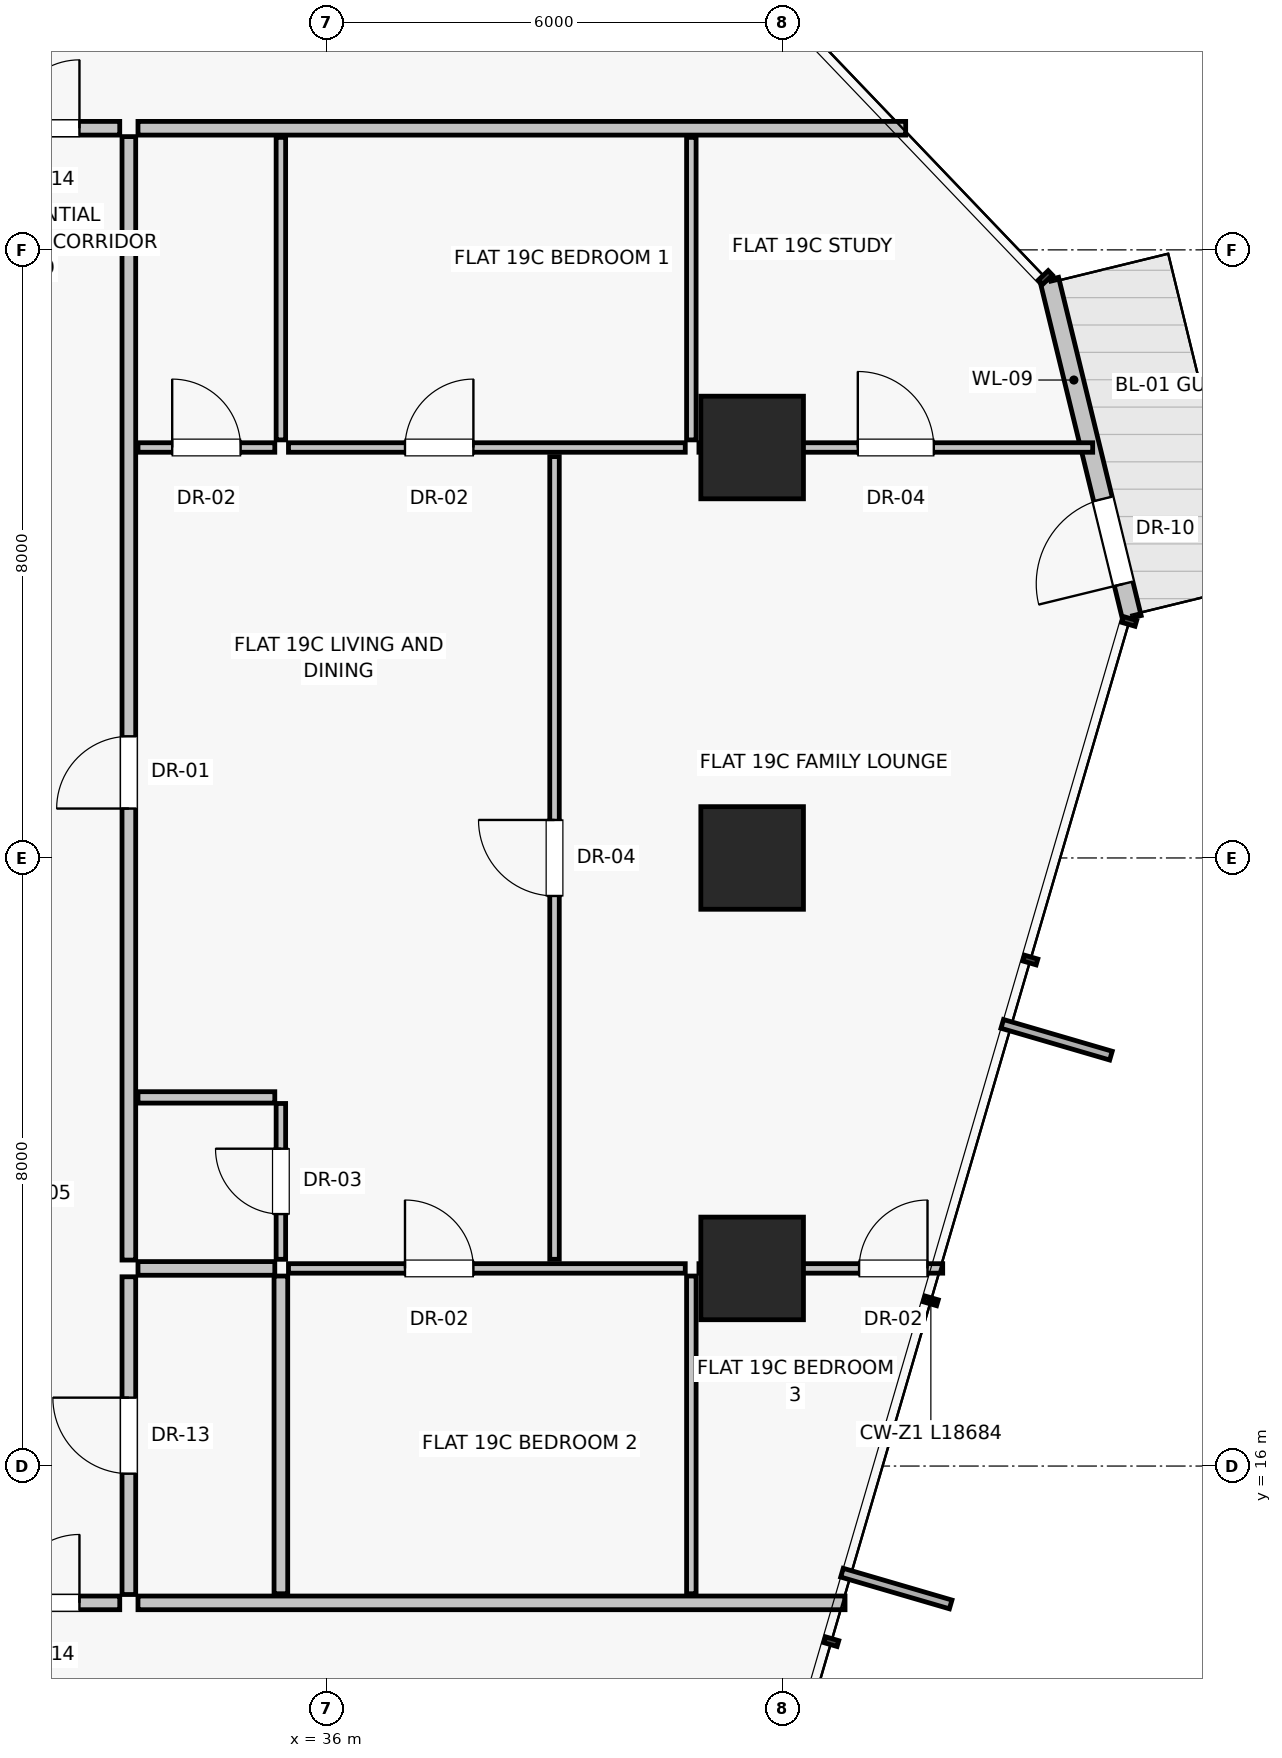
"""IFC4 building model, lengths in metres.
Left out: names, types, materials, properties, quantities, classifications, styles, units other than length and angle.
Written with IfcOpenShell. Run it as: python <this file> out.ifc"""

import sys

from ifc_helpers import new_model, si_unit, direction, frame, frame_2d, origin, origin_2d, place, context, subcontext, project, spatial, rectangle, extrude, source, transform, mapped, element, fill, save


model = new_model("IFC4")
c1 = context("Model", 3, precision=1e-05, world=origin(), true_north=direction((0.0, 1.0)))
c2 = subcontext(c1, "Body", "Model", "MODEL_VIEW")
j1 = project(units=[si_unit("LENGTHUNIT", "METRE"), si_unit("PLANEANGLEUNIT", "RADIAN")], contexts=[c1])
p1 = place(None, origin())
s1 = spatial("IfcSite", under=j1, at=p1, CompositionType="ELEMENT")
p2 = place(p1, origin())
s2 = spatial("IfcBuilding", under=s1, at=p2, CompositionType="ELEMENT")
p3 = place(p2, frame((0.0, 0.0, 70.6)))
s3 = spatial("IfcBuildingStorey", under=s2, at=p3, CompositionType="ELEMENT", Elevation=70.6)
for number, where, z_axis, x_axis in (
    (1, (41.6, 18.6, 0.0), (0.0, 0.0, 1.0), (1.0, 0.0, 0.0)),
    (2, (41.6, 24.0, 0.0), (0.0, 0.0, 1.0), (1.0, 0.0, 0.0)),
    (3, (41.6, 29.4, 0.0), (0.0, 0.0, 1.0), (1.0, 0.0, 0.0)),
):
    element("IfcColumn", number, at=place(p3, frame(where, z_axis=z_axis, x_axis=x_axis)), inside=s3, PredefinedType="COLUMN", context=c2, shape_type="SweptSolid", body=[
        extrude(rectangle(XDim=1.35, YDim=1.35, at=origin_2d()), origin(), (0.0, 0.0, 1.0), 3.25),
    ])
p4 = place(p3, frame((46.596, 27.159, 0.0), z_axis=(0.0, 0.0, 1.0), x_axis=(-0.237201591256, 0.971460449584, 0.0)))
e4 = element("IfcWall", 4, at=p4, inside=s3, PredefinedType="SOLIDWALL", context=c2, shape_type="SweptSolid", body=[
    extrude(rectangle(XDim=4.58, YDim=0.25, at=frame_2d((2.29, 0.0))), origin(), (0.0, 0.0, 1.0), 3.0),
])
p5 = place(p4, frame((0.46, 0.0, 0.0)))
e5 = element("IfcOpeningElement", 5, at=p5, cuts=e4, PredefinedType="OPENING", context=c2, shape_type="SweptSolid", body=[
    extrude(rectangle(XDim=1.15, YDim=2.25, at=frame_2d((0.575, 1.125))), frame((0.0, 0.135, 0.0), z_axis=(0.0, -1.0, 0.0), x_axis=(1.0, 0.0, 0.0)), (0.0, 0.0, 1.0), 0.27),
])
p6 = place(p3, frame((33.52, 14.2, 0.0), z_axis=(0.0, 0.0, 1.0), x_axis=(1.0, 0.0, 0.0)))
e6 = element("IfcWall", 6, at=p6, inside=s3, PredefinedType="PARTITIONING", context=c2, shape_type="SweptSolid", body=[
    extrude(rectangle(XDim=9.302, YDim=0.18, at=frame_2d((4.651, 0.0))), origin(), (0.0, 0.0, 1.0), 3.0),
])
p7 = place(p3, frame((33.52, 33.6, 0.0), z_axis=(0.0, 0.0, 1.0), x_axis=(1.0, 0.0, 0.0)))
e7 = element("IfcWall", 7, at=p7, inside=s3, PredefinedType="PARTITIONING", context=c2, shape_type="SweptSolid", body=[
    extrude(rectangle(XDim=10.1, YDim=0.18, at=frame_2d((5.05, 0.0))), origin(), (0.0, 0.0, 1.0), 3.0),
])
p8 = place(p3, frame((33.4, 14.31, 0.0), z_axis=(0.0, 0.0, 1.0), x_axis=(0.0, 1.0, 0.0)))
e8 = element("IfcWall", 8, at=p8, inside=s3, PredefinedType="PARTITIONING", context=c2, shape_type="SweptSolid", body=[
    extrude(rectangle(XDim=4.18, YDim=0.18, at=frame_2d((2.09, 0.0))), origin(), (0.0, 0.0, 1.0), 3.0),
])
p9 = place(p8, frame((1.59, 0.0, 0.0)))
e9 = element("IfcOpeningElement", 9, at=p9, cuts=e8, PredefinedType="OPENING", context=c2, shape_type="SweptSolid", body=[
    extrude(rectangle(XDim=1.0, YDim=2.01, at=frame_2d((0.5, 1.005))), frame((0.0, 0.1, 0.0), z_axis=(0.0, -1.0, 0.0), x_axis=(1.0, 0.0, 0.0)), (0.0, 0.0, 1.0), 0.2),
])
p10 = place(p3, frame((33.4, 18.71, 0.0), z_axis=(0.0, 0.0, 1.0), x_axis=(0.0, 1.0, 0.0)))
e10 = element("IfcWall", 10, at=p10, inside=s3, PredefinedType="PARTITIONING", context=c2, shape_type="SweptSolid", body=[
    extrude(rectangle(XDim=14.78, YDim=0.18, at=frame_2d((7.39, 0.0))), origin(), (0.0, 0.0, 1.0), 3.0),
])
p11 = place(p10, frame((5.94, 0.0, 0.0)))
e11 = element("IfcOpeningElement", 11, at=p11, cuts=e10, PredefinedType="OPENING", context=c2, shape_type="SweptSolid", body=[
    extrude(rectangle(XDim=0.95, YDim=2.02, at=frame_2d((0.475, 1.01))), frame((0.0, 0.1, 0.0), z_axis=(0.0, -1.0, 0.0), x_axis=(1.0, 0.0, 0.0)), (0.0, 0.0, 1.0), 0.2),
])
p12 = place(p3, frame((40.8, 14.32, 0.0), z_axis=(0.0, 0.0, 1.0), x_axis=(0.0, 1.0, 0.0)))
e12 = element("IfcWall", 12, at=p12, inside=s3, PredefinedType="PARTITIONING", context=c2, shape_type="SweptSolid", body=[
    extrude(rectangle(XDim=4.18, YDim=0.125, at=frame_2d((2.09, 0.0))), origin(), (0.0, 0.0, 1.0), 3.0),
])
p13 = place(p3, frame((40.9, 18.6, 0.0), z_axis=(0.0, 0.0, 1.0), x_axis=(1.0, 0.0, 0.0)))
e13 = element("IfcWall", 13, at=p13, inside=s3, PredefinedType="PARTITIONING", context=c2, shape_type="SweptSolid", body=[
    extrude(rectangle(XDim=3.207, YDim=0.125, at=frame_2d((1.604, 0.0))), origin(), (0.0, 0.0, 1.0), 2.299),
])
p14 = place(p13, frame((2.107, 0.0, 0.0)))
e14 = element("IfcOpeningElement", 14, at=p14, cuts=e13, PredefinedType="OPENING", context=c2, shape_type="SweptSolid", body=[
    extrude(rectangle(XDim=0.9, YDim=2.01, at=frame_2d((0.45, 1.005))), frame((0.0, 0.073, 0.0), z_axis=(0.0, -1.0, 0.0), x_axis=(1.0, 0.0, 0.0)), (0.0, 0.0, 1.0), 0.145),
])
p15 = place(p3, frame((40.8, 29.5, 0.0), z_axis=(0.0, 0.0, 1.0), x_axis=(0.0, 1.0, 0.0)))
e15 = element("IfcWall", 15, at=p15, inside=s3, PredefinedType="PARTITIONING", context=c2, shape_type="SweptSolid", body=[
    extrude(rectangle(XDim=3.98, YDim=0.125, at=frame_2d((1.99, 0.0))), origin(), (0.0, 0.0, 1.0), 3.0),
])
p16 = place(p3, frame((40.9, 29.4, 0.0), z_axis=(0.0, 0.0, 1.0), x_axis=(1.0, 0.0, 0.0)))
e16 = element("IfcWall", 16, at=p16, inside=s3, PredefinedType="PARTITIONING", context=c2, shape_type="SweptSolid", body=[
    extrude(rectangle(XDim=5.18, YDim=0.125, at=frame_2d((2.59, 0.0))), origin(), (0.0, 0.0, 1.0), 2.299),
])
p17 = place(p16, frame((2.09, 0.0, 0.0)))
e17 = element("IfcOpeningElement", 17, at=p17, cuts=e16, PredefinedType="OPENING", context=c2, shape_type="SweptSolid", body=[
    extrude(rectangle(XDim=1.0, YDim=2.01, at=frame_2d((0.5, 1.005))), frame((0.0, 0.073, 0.0), z_axis=(0.0, -1.0, 0.0), x_axis=(1.0, 0.0, 0.0)), (0.0, 0.0, 1.0), 0.145),
])
p18 = place(p3, frame((39.0, 18.72, 0.0), z_axis=(0.0, 0.0, 1.0), x_axis=(0.0, 1.0, 0.0)))
e18 = element("IfcWall", 18, at=p18, inside=s3, PredefinedType="PARTITIONING", context=c2, shape_type="SweptSolid", body=[
    extrude(rectangle(XDim=10.56, YDim=0.125, at=frame_2d((5.28, 0.0))), origin(), (0.0, 0.0, 1.0), 3.0),
])
p19 = place(p18, frame((4.78, 0.0, 0.0)))
e19 = element("IfcOpeningElement", 19, at=p19, cuts=e18, PredefinedType="OPENING", context=c2, shape_type="SweptSolid", body=[
    extrude(rectangle(XDim=1.0, YDim=2.01, at=frame_2d((0.5, 1.005))), frame((0.0, 0.073, 0.0), z_axis=(0.0, -1.0, 0.0), x_axis=(1.0, 0.0, 0.0)), (0.0, 0.0, 1.0), 0.145),
])
p20 = place(p3, frame((35.4, 14.32, 0.0), z_axis=(0.0, 0.0, 1.0), x_axis=(0.0, 1.0, 0.0)))
e20 = element("IfcWall", 20, at=p20, inside=s3, PredefinedType="PARTITIONING", context=c2, shape_type="SweptSolid", body=[
    extrude(rectangle(XDim=4.18, YDim=0.18, at=frame_2d((2.09, 0.0))), origin(), (0.0, 0.0, 1.0), 3.0),
])
p21 = place(p3, frame((33.52, 18.6, 0.0), z_axis=(0.0, 0.0, 1.0), x_axis=(1.0, 0.0, 0.0)))
e21 = element("IfcWall", 21, at=p21, inside=s3, PredefinedType="PARTITIONING", context=c2, shape_type="SweptSolid", body=[
    extrude(rectangle(XDim=1.8, YDim=0.18, at=frame_2d((0.9, 0.0))), origin(), (0.0, 0.0, 1.0), 3.0),
])
p22 = place(p3, frame((35.5, 18.6, 0.0), z_axis=(0.0, 0.0, 1.0), x_axis=(1.0, 0.0, 0.0)))
e22 = element("IfcWall", 22, at=p22, inside=s3, PredefinedType="PARTITIONING", context=c2, shape_type="SweptSolid", body=[
    extrude(rectangle(XDim=5.22, YDim=0.125, at=frame_2d((2.61, 0.0))), origin(), (0.0, 0.0, 1.0), 2.299),
])
p23 = place(p22, frame((1.533, 0.0, 0.0)))
e23 = element("IfcOpeningElement", 23, at=p23, cuts=e22, PredefinedType="OPENING", context=c2, shape_type="SweptSolid", body=[
    extrude(rectangle(XDim=0.9, YDim=2.01, at=frame_2d((0.45, 1.005))), frame((0.0, 0.073, 0.0), z_axis=(0.0, -1.0, 0.0), x_axis=(1.0, 0.0, 0.0)), (0.0, 0.0, 1.0), 0.145),
])
p24 = place(p3, frame((33.52, 20.85, 0.0), z_axis=(0.0, 0.0, 1.0), x_axis=(1.0, 0.0, 0.0)))
e24 = element("IfcWall", 24, at=p24, inside=s3, PredefinedType="PARTITIONING", context=c2, shape_type="SweptSolid", body=[
    extrude(rectangle(XDim=1.8, YDim=0.15, at=frame_2d((0.9, 0.0))), origin(), (0.0, 0.0, 1.0), 3.0),
])
p25 = place(p3, frame((35.4, 18.72, 0.0), z_axis=(0.0, 0.0, 1.0), x_axis=(0.0, 1.0, 0.0)))
e25 = element("IfcWall", 25, at=p25, inside=s3, PredefinedType="PARTITIONING", context=c2, shape_type="SweptSolid", body=[
    extrude(rectangle(XDim=2.05, YDim=0.125, at=frame_2d((1.025, 0.0))), origin(), (0.0, 0.0, 1.0), 3.0),
])
p26 = place(p25, frame((0.595, 0.0, 0.0)))
e26 = element("IfcOpeningElement", 26, at=p26, cuts=e25, PredefinedType="OPENING", context=c2, shape_type="SweptSolid", body=[
    extrude(rectangle(XDim=0.86, YDim=2.01, at=frame_2d((0.43, 1.005))), frame((0.0, 0.073, 0.0), z_axis=(0.0, -1.0, 0.0), x_axis=(1.0, 0.0, 0.0)), (0.0, 0.0, 1.0), 0.145),
])
p27 = place(p3, frame((33.52, 29.4, 0.0), z_axis=(0.0, 0.0, 1.0), x_axis=(1.0, 0.0, 0.0)))
e27 = element("IfcWall", 27, at=p27, inside=s3, PredefinedType="PARTITIONING", context=c2, shape_type="SweptSolid", body=[
    extrude(rectangle(XDim=1.8, YDim=0.125, at=frame_2d((0.9, 0.0))), origin(), (0.0, 0.0, 1.0), 3.0),
])
p28 = place(p27, frame((0.45, 0.0, 0.0)))
e28 = element("IfcOpeningElement", 28, at=p28, cuts=e27, PredefinedType="OPENING", context=c2, shape_type="SweptSolid", body=[
    extrude(rectangle(XDim=0.9, YDim=2.01, at=frame_2d((0.45, 1.005))), frame((0.0, 0.073, 0.0), z_axis=(0.0, -1.0, 0.0), x_axis=(1.0, 0.0, 0.0)), (0.0, 0.0, 1.0), 0.145),
])
p29 = place(p3, frame((35.4, 29.5, 0.0), z_axis=(0.0, 0.0, 1.0), x_axis=(0.0, 1.0, 0.0)))
e29 = element("IfcWall", 29, at=p29, inside=s3, PredefinedType="PARTITIONING", context=c2, shape_type="SweptSolid", body=[
    extrude(rectangle(XDim=3.98, YDim=0.125, at=frame_2d((1.99, 0.0))), origin(), (0.0, 0.0, 1.0), 3.0),
])
p30 = place(p3, frame((35.5, 29.4, 0.0), z_axis=(0.0, 0.0, 1.0), x_axis=(1.0, 0.0, 0.0)))
e30 = element("IfcWall", 30, at=p30, inside=s3, PredefinedType="PARTITIONING", context=c2, shape_type="SweptSolid", body=[
    extrude(rectangle(XDim=5.22, YDim=0.125, at=frame_2d((2.61, 0.0))), origin(), (0.0, 0.0, 1.0), 2.299),
])
p31 = place(p30, frame((1.533, 0.0, 0.0)))
e31 = element("IfcOpeningElement", 31, at=p31, cuts=e30, PredefinedType="OPENING", context=c2, shape_type="SweptSolid", body=[
    extrude(rectangle(XDim=0.9, YDim=2.01, at=frame_2d((0.45, 1.005))), frame((0.0, 0.073, 0.0), z_axis=(0.0, -1.0, 0.0), x_axis=(1.0, 0.0, 0.0)), (0.0, 0.0, 1.0), 0.145),
])
p32 = place(p3, frame((31.32, 14.2, 0.0), z_axis=(0.0, 0.0, 1.0), x_axis=(1.0, 0.0, 0.0)))
e32 = element("IfcWall", 32, at=p32, inside=s3, PredefinedType="PARTITIONING", context=c2, shape_type="SweptSolid", body=[
    extrude(rectangle(XDim=1.96, YDim=0.18, at=frame_2d((0.98, 0.0))), origin(), (0.0, 0.0, 1.0), 3.0),
])
p33 = place(p32, frame((0.53, 0.0, 0.0)))
e33 = element("IfcOpeningElement", 33, at=p33, cuts=e32, PredefinedType="OPENING", context=c2, shape_type="SweptSolid", body=[
    extrude(rectangle(XDim=0.9, YDim=2.01, at=frame_2d((0.45, 1.005))), frame((0.0, 0.1, 0.0), z_axis=(0.0, -1.0, 0.0), x_axis=(1.0, 0.0, 0.0)), (0.0, 0.0, 1.0), 0.2),
])
p34 = place(p3, frame((31.32, 33.6, 0.0), z_axis=(0.0, 0.0, 1.0), x_axis=(1.0, 0.0, 0.0)))
e34 = element("IfcWall", 34, at=p34, inside=s3, PredefinedType="PARTITIONING", context=c2, shape_type="SweptSolid", body=[
    extrude(rectangle(XDim=1.96, YDim=0.18, at=frame_2d((0.98, 0.0))), origin(), (0.0, 0.0, 1.0), 3.0),
])
p35 = place(p34, frame((0.53, 0.0, 0.0)))
e35 = element("IfcOpeningElement", 35, at=p35, cuts=e34, PredefinedType="OPENING", context=c2, shape_type="SweptSolid", body=[
    extrude(rectangle(XDim=0.9, YDim=2.01, at=frame_2d((0.45, 1.005))), frame((0.0, 0.1, 0.0), z_axis=(0.0, -1.0, 0.0), x_axis=(1.0, 0.0, 0.0)), (0.0, 0.0, 1.0), 0.2),
])
m1 = source(origin(), c2, "Body", "SweptSolid", [
    extrude(rectangle(XDim=1.15, YDim=2.25, at=frame_2d((0.575, 1.125))), frame((0.0, 0.025, 0.0), z_axis=(0.0, -1.0, 0.0), x_axis=(1.0, 0.0, 0.0)), (0.0, 0.0, 1.0), 0.05),
])
p36 = place(p5, frame((1.15, 0.0, 0.0), z_axis=(0.0, 0.0, 1.0), x_axis=(-1.0, 0.0, 0.0)))
e36 = element("IfcDoor", 36, at=p36, inside=s3, OperationType="SINGLE_SWING_LEFT", PredefinedType="DOOR", context=c2, shape_type="MappedRepresentation", body=[
    mapped(m1, transform((0.0, 0.0, 0.0), scale=1.0)),
])
fill(e5, e36)
m2 = source(origin(), c2, "Body", "SweptSolid", [
    extrude(rectangle(XDim=1.0, YDim=2.01, at=frame_2d((0.5, 1.005))), frame((0.0, 0.025, 0.0), z_axis=(0.0, -1.0, 0.0), x_axis=(1.0, 0.0, 0.0)), (0.0, 0.0, 1.0), 0.05),
])
p37 = place(p9, origin())
e37 = element("IfcDoor", 37, at=p37, inside=s3, OperationType="SINGLE_SWING_RIGHT", PredefinedType="DOOR", context=c2, shape_type="MappedRepresentation", body=[
    mapped(m2, transform((0.0, 0.0, 0.0), scale=1.0)),
])
fill(e9, e37)
m3 = source(origin(), c2, "Body", "SweptSolid", [
    extrude(rectangle(XDim=0.95, YDim=2.02, at=frame_2d((0.475, 1.01))), frame((0.0, 0.025, 0.0), z_axis=(0.0, -1.0, 0.0), x_axis=(1.0, 0.0, 0.0)), (0.0, 0.0, 1.0), 0.05),
])
p38 = place(p11, origin())
e38 = element("IfcDoor", 38, at=p38, inside=s3, OperationType="SINGLE_SWING_LEFT", PredefinedType="DOOR", context=c2, shape_type="MappedRepresentation", body=[
    mapped(m3, transform((0.0, 0.0, 0.0), scale=1.0)),
])
fill(e11, e38)
m4 = source(origin(), c2, "Body", "SweptSolid", [
    extrude(rectangle(XDim=0.9, YDim=2.01, at=frame_2d((0.45, 1.005))), frame((0.0, 0.025, 0.0), z_axis=(0.0, -1.0, 0.0), x_axis=(1.0, 0.0, 0.0)), (0.0, 0.0, 1.0), 0.05),
])
p39 = place(p14, origin())
e39 = element("IfcDoor", 39, at=p39, inside=s3, OperationType="SINGLE_SWING_RIGHT", PredefinedType="DOOR", context=c2, shape_type="MappedRepresentation", body=[
    mapped(m4, transform((0.0, 0.0, 0.0), scale=1.0)),
])
fill(e14, e39)
p40 = place(p17, origin())
e40 = element("IfcDoor", 40, at=p40, inside=s3, OperationType="SINGLE_SWING_LEFT", PredefinedType="DOOR", context=c2, shape_type="MappedRepresentation", body=[
    mapped(m2, transform((0.0, 0.0, 0.0), scale=1.0)),
])
fill(e17, e40)
p41 = place(p19, origin())
e41 = element("IfcDoor", 41, at=p41, inside=s3, OperationType="SINGLE_SWING_RIGHT", PredefinedType="DOOR", context=c2, shape_type="MappedRepresentation", body=[
    mapped(m2, transform((0.0, 0.0, 0.0), scale=1.0)),
])
fill(e19, e41)
p42 = place(p23, origin())
e42 = element("IfcDoor", 42, at=p42, inside=s3, OperationType="SINGLE_SWING_LEFT", PredefinedType="DOOR", context=c2, shape_type="MappedRepresentation", body=[
    mapped(m4, transform((0.0, 0.0, 0.0), scale=1.0)),
])
fill(e23, e42)
m5 = source(origin(), c2, "Body", "SweptSolid", [
    extrude(rectangle(XDim=0.86, YDim=2.01, at=frame_2d((0.43, 1.005))), frame((0.0, 0.025, 0.0), z_axis=(0.0, -1.0, 0.0), x_axis=(1.0, 0.0, 0.0)), (0.0, 0.0, 1.0), 0.05),
])
p43 = place(p26, origin())
e43 = element("IfcDoor", 43, at=p43, inside=s3, OperationType="SINGLE_SWING_RIGHT", PredefinedType="DOOR", context=c2, shape_type="MappedRepresentation", body=[
    mapped(m5, transform((0.0, 0.0, 0.0), scale=1.0)),
])
fill(e26, e43)
p44 = place(p28, origin())
e44 = element("IfcDoor", 44, at=p44, inside=s3, OperationType="SINGLE_SWING_LEFT", PredefinedType="DOOR", context=c2, shape_type="MappedRepresentation", body=[
    mapped(m4, transform((0.0, 0.0, 0.0), scale=1.0)),
])
fill(e28, e44)
p45 = place(p31, origin())
e45 = element("IfcDoor", 45, at=p45, inside=s3, OperationType="SINGLE_SWING_RIGHT", PredefinedType="DOOR", context=c2, shape_type="MappedRepresentation", body=[
    mapped(m4, transform((0.0, 0.0, 0.0), scale=1.0)),
])
fill(e31, e45)
p46 = place(p33, origin())
e46 = element("IfcDoor", 46, at=p46, inside=s3, OperationType="SINGLE_SWING_RIGHT", PredefinedType="DOOR", context=c2, shape_type="MappedRepresentation", body=[
    mapped(m4, transform((0.0, 0.0, 0.0), scale=1.0)),
])
fill(e33, e46)
p47 = place(p35, origin())
e47 = element("IfcDoor", 47, at=p47, inside=s3, OperationType="SINGLE_SWING_RIGHT", PredefinedType="DOOR", context=c2, shape_type="MappedRepresentation", body=[
    mapped(m4, transform((0.0, 0.0, 0.0), scale=1.0)),
])
fill(e35, e47)
save(model, sys.argv[1])
